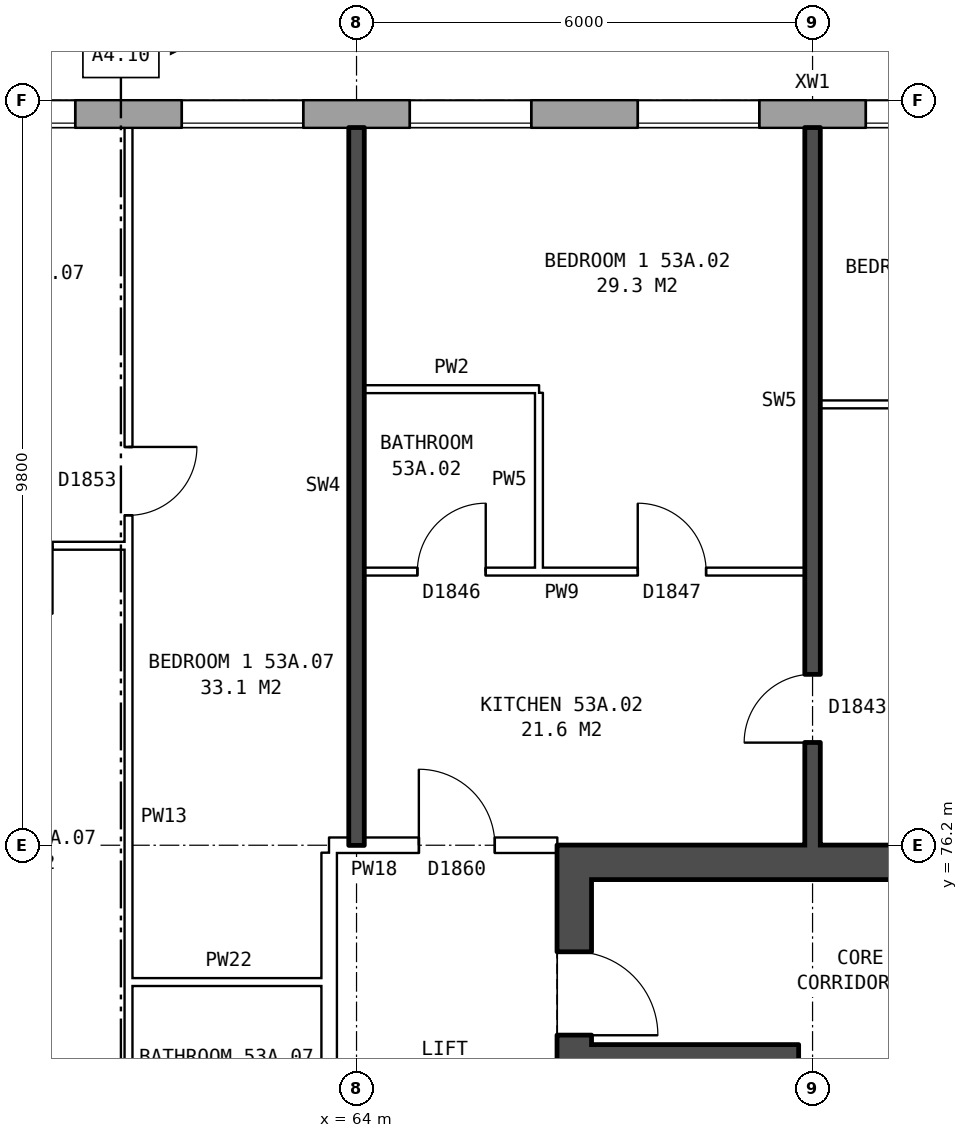
"""IFC4 building model, lengths in metres.
Left out: names, types, materials, properties, quantities, classifications, styles, units other than length and angle.
Written with IfcOpenShell. Run it as: python <this file> out.ifc"""

import sys

from ifc_helpers import new_model, si_unit, direction, frame, frame_2d, origin, place, context, subcontext, project, spatial, rectangle, extrude, element, fill, save


model = new_model("IFC4")
c1 = context("Model", 3, precision=1e-05, world=origin(), true_north=direction((0.0, 1.0)))
c2 = subcontext(c1, "Body", "Model", "MODEL_VIEW")
j1 = project(units=[si_unit("LENGTHUNIT", "METRE"), si_unit("PLANEANGLEUNIT", "RADIAN")], contexts=[c1])
p1 = place(None, origin())
s1 = spatial("IfcSite", under=j1, at=p1, CompositionType="ELEMENT")
p2 = place(p1, origin())
s2 = spatial("IfcBuilding", under=s1, at=p2, CompositionType="ELEMENT")
p3 = place(p2, frame((0.0, 0.0, 188.2)))
s3 = spatial("IfcBuildingStorey", under=s2, at=p3, CompositionType="ELEMENT", Elevation=188.2)
p4 = place(p3, frame((72.925, 85.82, 0.0), z_axis=(0.0, 0.0, 1.0), x_axis=(-1.0, 0.0, 0.0)))
e1 = element("IfcWall", 1, at=p4, inside=s3, PredefinedType="STANDARD", context=c2, shape_type="SweptSolid", body=[
    extrude(rectangle(XDim=39.601, YDim=0.36, at=frame_2d((19.8, 0.0))), origin(), (0.0, 0.0, 1.0), 2.85),
])
p5 = place(p4, frame((0.625, 0.0, 0.8)))
e2 = element("IfcOpeningElement", 2, at=p5, cuts=e1, PredefinedType="OPENING", context=c2, shape_type="SweptSolid", body=[
    extrude(rectangle(XDim=1.6, YDim=1.8, at=frame_2d((0.8, 0.9))), frame((0.0, 0.19, 0.0), z_axis=(0.0, -1.0, 0.0), x_axis=(1.0, 0.0, 0.0)), (0.0, 0.0, 1.0), 0.38),
])
p6 = place(p4, frame((3.625, 0.0, 0.8)))
e3 = element("IfcOpeningElement", 3, at=p6, cuts=e1, PredefinedType="OPENING", context=c2, shape_type="SweptSolid", body=[
    extrude(rectangle(XDim=1.6, YDim=1.8, at=frame_2d((0.8, 0.9))), frame((0.0, 0.19, 0.0), z_axis=(0.0, -1.0, 0.0), x_axis=(1.0, 0.0, 0.0)), (0.0, 0.0, 1.0), 0.38),
])
p7 = place(p4, frame((6.625, 0.0, 0.8)))
e4 = element("IfcOpeningElement", 4, at=p7, cuts=e1, PredefinedType="OPENING", context=c2, shape_type="SweptSolid", body=[
    extrude(rectangle(XDim=1.6, YDim=1.8, at=frame_2d((0.8, 0.9))), frame((0.0, 0.19, 0.0), z_axis=(0.0, -1.0, 0.0), x_axis=(1.0, 0.0, 0.0)), (0.0, 0.0, 1.0), 0.38),
])
p8 = place(p4, frame((9.625, 0.0, 0.8)))
e5 = element("IfcOpeningElement", 5, at=p8, cuts=e1, PredefinedType="OPENING", context=c2, shape_type="SweptSolid", body=[
    extrude(rectangle(XDim=1.6, YDim=1.8, at=frame_2d((0.8, 0.9))), frame((0.0, 0.19, 0.0), z_axis=(0.0, -1.0, 0.0), x_axis=(1.0, 0.0, 0.0)), (0.0, 0.0, 1.0), 0.38),
])
p9 = place(p4, frame((12.625, 0.0, 0.8)))
e6 = element("IfcOpeningElement", 6, at=p9, cuts=e1, PredefinedType="OPENING", context=c2, shape_type="SweptSolid", body=[
    extrude(rectangle(XDim=1.6, YDim=1.8, at=frame_2d((0.8, 0.9))), frame((0.0, 0.19, 0.0), z_axis=(0.0, -1.0, 0.0), x_axis=(1.0, 0.0, 0.0)), (0.0, 0.0, 1.0), 0.38),
])
p10 = place(p4, frame((15.575, 0.0, 0.15)))
e7 = element("IfcOpeningElement", 7, at=p10, cuts=e1, PredefinedType="OPENING", context=c2, shape_type="SweptSolid", body=[
    extrude(rectangle(XDim=0.6, YDim=0.9, at=frame_2d((0.3, 0.45))), frame((0.0, 0.19, 0.0), z_axis=(0.0, -1.0, 0.0), x_axis=(1.0, 0.0, 0.0)), (0.0, 0.0, 1.0), 0.38),
])
p11 = place(p4, frame((18.625, 0.0, 0.8)))
e8 = element("IfcOpeningElement", 8, at=p11, cuts=e1, PredefinedType="OPENING", context=c2, shape_type="SweptSolid", body=[
    extrude(rectangle(XDim=1.6, YDim=1.8, at=frame_2d((0.8, 0.9))), frame((0.0, 0.19, 0.0), z_axis=(0.0, -1.0, 0.0), x_axis=(1.0, 0.0, 0.0)), (0.0, 0.0, 1.0), 0.38),
])
p12 = place(p4, frame((21.125, 0.0, 0.8)))
e9 = element("IfcOpeningElement", 9, at=p12, cuts=e1, PredefinedType="OPENING", context=c2, shape_type="SweptSolid", body=[
    extrude(rectangle(XDim=1.2, YDim=1.8, at=frame_2d((0.6, 0.9))), frame((0.0, 0.19, 0.0), z_axis=(0.0, -1.0, 0.0), x_axis=(1.0, 0.0, 0.0)), (0.0, 0.0, 1.0), 0.38),
])
p13 = place(p4, frame((24.525, 0.0, 1.7)))
e10 = element("IfcOpeningElement", 10, at=p13, cuts=e1, PredefinedType="OPENING", context=c2, shape_type="SweptSolid", body=[
    extrude(rectangle(XDim=0.6, YDim=0.9, at=frame_2d((0.3, 0.45))), frame((0.0, 0.19, 0.0), z_axis=(0.0, -1.0, 0.0), x_axis=(1.0, 0.0, 0.0)), (0.0, 0.0, 1.0), 0.38),
])
p14 = place(p4, frame((27.625, 0.0, 0.8)))
e11 = element("IfcOpeningElement", 11, at=p14, cuts=e1, PredefinedType="OPENING", context=c2, shape_type="SweptSolid", body=[
    extrude(rectangle(XDim=1.6, YDim=1.8, at=frame_2d((0.8, 0.9))), frame((0.0, 0.19, 0.0), z_axis=(0.0, -1.0, 0.0), x_axis=(1.0, 0.0, 0.0)), (0.0, 0.0, 1.0), 0.38),
])
p15 = place(p4, frame((30.625, 0.0, 0.8)))
e12 = element("IfcOpeningElement", 12, at=p15, cuts=e1, PredefinedType="OPENING", context=c2, shape_type="SweptSolid", body=[
    extrude(rectangle(XDim=1.6, YDim=1.8, at=frame_2d((0.8, 0.9))), frame((0.0, 0.19, 0.0), z_axis=(0.0, -1.0, 0.0), x_axis=(1.0, 0.0, 0.0)), (0.0, 0.0, 1.0), 0.38),
])
p16 = place(p4, frame((33.625, 0.0, 0.8)))
e13 = element("IfcOpeningElement", 13, at=p16, cuts=e1, PredefinedType="OPENING", context=c2, shape_type="SweptSolid", body=[
    extrude(rectangle(XDim=1.6, YDim=1.8, at=frame_2d((0.8, 0.9))), frame((0.0, 0.19, 0.0), z_axis=(0.0, -1.0, 0.0), x_axis=(1.0, 0.0, 0.0)), (0.0, 0.0, 1.0), 0.38),
])
p17 = place(p4, frame((36.625, 0.0, 0.8)))
e14 = element("IfcOpeningElement", 14, at=p17, cuts=e1, PredefinedType="OPENING", context=c2, shape_type="SweptSolid", body=[
    extrude(rectangle(XDim=1.6, YDim=1.8, at=frame_2d((0.8, 0.9))), frame((0.0, 0.19, 0.0), z_axis=(0.0, -1.0, 0.0), x_axis=(1.0, 0.0, 0.0)), (0.0, 0.0, 1.0), 0.38),
])
p18 = place(p4, frame((16.475, 0.0, 0.15)))
e15 = element("IfcOpeningElement", 15, at=p18, cuts=e1, PredefinedType="OPENING", context=c2, shape_type="SweptSolid", body=[
    extrude(rectangle(XDim=1.2, YDim=1.8, at=frame_2d((0.6, 0.9))), frame((0.0, 0.19, 0.0), z_axis=(0.0, -1.0, 0.0), x_axis=(1.0, 0.0, 0.0)), (0.0, 0.0, 1.0), 0.38),
])
p19 = place(p4, frame((22.625, 0.0, 0.8)))
e16 = element("IfcOpeningElement", 16, at=p19, cuts=e1, PredefinedType="OPENING", context=c2, shape_type="SweptSolid", body=[
    extrude(rectangle(XDim=0.6, YDim=0.9, at=frame_2d((0.3, 0.45))), frame((0.0, 0.19, 0.0), z_axis=(0.0, -1.0, 0.0), x_axis=(1.0, 0.0, 0.0)), (0.0, 0.0, 1.0), 0.38),
])
p20 = place(p4, frame((25.425, 0.0, 0.8)))
e17 = element("IfcOpeningElement", 17, at=p20, cuts=e1, PredefinedType="OPENING", context=c2, shape_type="SweptSolid", body=[
    extrude(rectangle(XDim=1.2, YDim=1.8, at=frame_2d((0.6, 0.9))), frame((0.0, 0.19, 0.0), z_axis=(0.0, -1.0, 0.0), x_axis=(1.0, 0.0, 0.0)), (0.0, 0.0, 1.0), 0.38),
])
p21 = place(p3, frame((66.865, 63.8, 0.0), z_axis=(0.0, 0.0, 1.0), x_axis=(0.0, 1.0, 0.0)))
e18 = element("IfcWall", 18, at=p21, inside=s3, PredefinedType="SHEAR", context=c2, shape_type="SweptSolid", body=[
    extrude(rectangle(XDim=12.4, YDim=0.45, at=frame_2d((6.2, 0.0))), origin(), (0.0, 0.0, 1.0), 2.85),
])
p22 = place(p21, frame((1.325, 0.0, 0.0)))
e19 = element("IfcOpeningElement", 19, at=p22, cuts=e18, PredefinedType="OPENING", context=c2, shape_type="SweptSolid", body=[
    extrude(rectangle(XDim=1.1, YDim=2.1, at=frame_2d((0.55, 1.05))), frame((0.0, 0.235, 0.0), z_axis=(0.0, -1.0, 0.0), x_axis=(1.0, 0.0, 0.0)), (0.0, 0.0, 1.0), 0.47),
])
p23 = place(p21, frame((3.6, 0.0, 0.0)))
e20 = element("IfcOpeningElement", 20, at=p23, cuts=e18, PredefinedType="OPENING", context=c2, shape_type="SweptSolid", body=[
    extrude(rectangle(XDim=1.1, YDim=2.1, at=frame_2d((0.55, 1.05))), frame((0.0, 0.235, 0.0), z_axis=(0.0, -1.0, 0.0), x_axis=(1.0, 0.0, 0.0)), (0.0, 0.0, 1.0), 0.47),
])
p24 = place(p21, frame((5.8, 0.0, 0.0)))
e21 = element("IfcOpeningElement", 21, at=p24, cuts=e18, PredefinedType="OPENING", context=c2, shape_type="SweptSolid", body=[
    extrude(rectangle(XDim=1.1, YDim=2.1, at=frame_2d((0.55, 1.05))), frame((0.0, 0.235, 0.0), z_axis=(0.0, -1.0, 0.0), x_axis=(1.0, 0.0, 0.0)), (0.0, 0.0, 1.0), 0.47),
])
p25 = place(p21, frame((8.0, 0.0, 0.0)))
e22 = element("IfcOpeningElement", 22, at=p25, cuts=e18, PredefinedType="OPENING", context=c2, shape_type="SweptSolid", body=[
    extrude(rectangle(XDim=1.1, YDim=2.1, at=frame_2d((0.55, 1.05))), frame((0.0, 0.235, 0.0), z_axis=(0.0, -1.0, 0.0), x_axis=(1.0, 0.0, 0.0)), (0.0, 0.0, 1.0), 0.47),
])
p26 = place(p21, frame((9.9, 0.0, 0.0)))
e23 = element("IfcOpeningElement", 23, at=p26, cuts=e18, PredefinedType="OPENING", context=c2, shape_type="SweptSolid", body=[
    extrude(rectangle(XDim=1.1, YDim=2.1, at=frame_2d((0.55, 1.05))), frame((0.0, 0.235, 0.0), z_axis=(0.0, -1.0, 0.0), x_axis=(1.0, 0.0, 0.0)), (0.0, 0.0, 1.0), 0.47),
])
p27 = place(p3, frame((67.09, 75.975, 0.0), z_axis=(0.0, 0.0, 1.0), x_axis=(1.0, 0.0, 0.0)))
e24 = element("IfcWall", 24, at=p27, inside=s3, PredefinedType="SHEAR", context=c2, shape_type="SweptSolid", body=[
    extrude(rectangle(XDim=8.1, YDim=0.45, at=frame_2d((4.05, 0.0))), origin(), (0.0, 0.0, 1.0), 2.85),
])
p28 = place(p3, frame((67.09, 73.45, 0.0), z_axis=(0.0, 0.0, 1.0), x_axis=(1.0, 0.0, 0.0)))
e25 = element("IfcWall", 25, at=p28, inside=s3, PredefinedType="SHEAR", context=c2, shape_type="SweptSolid", body=[
    extrude(rectangle(XDim=2.475, YDim=0.25, at=frame_2d((1.237, 0.0))), origin(), (0.0, 0.0, 1.0), 2.85),
])
p29 = place(p3, frame((69.69, 66.975, 0.0), z_axis=(0.0, 0.0, 1.0), x_axis=(0.0, 1.0, 0.0)))
e26 = element("IfcWall", 26, at=p29, inside=s3, PredefinedType="SHEAR", context=c2, shape_type="SweptSolid", body=[
    extrude(rectangle(XDim=6.6, YDim=0.25, at=frame_2d((3.3, 0.0))), origin(), (0.0, 0.0, 1.0), 2.85),
])
p30 = place(p3, frame((63.64, 63.9, 0.0), z_axis=(0.0, 0.0, 1.0), x_axis=(0.0, 1.0, 0.0)))
e27 = element("IfcWall", 27, at=p30, inside=s3, PredefinedType="PARTITIONING", context=c2, shape_type="SweptSolid", body=[
    extrude(rectangle(XDim=12.2, YDim=0.2, at=frame_2d((6.1, 0.0))), origin(), (0.0, 0.0, 1.0), 2.85),
])
p31 = place(p30, frame((5.1, 0.0, 0.0)))
e28 = element("IfcOpeningElement", 28, at=p31, cuts=e27, PredefinedType="OPENING", context=c2, shape_type="SweptSolid", body=[
    extrude(rectangle(XDim=2.0, YDim=2.1, at=frame_2d((1.0, 1.05))), frame((0.0, 0.11, 0.0), z_axis=(0.0, -1.0, 0.0), x_axis=(1.0, 0.0, 0.0)), (0.0, 0.0, 1.0), 0.22),
])
p32 = place(p3, frame((61.0, 74.4, 0.0), z_axis=(0.0, 0.0, 1.0), x_axis=(1.0, 0.0, 0.0)))
e29 = element("IfcWall", 29, at=p32, inside=s3, PredefinedType="PARTITIONING", context=c2, shape_type="SweptSolid", body=[
    extrude(rectangle(XDim=2.64, YDim=0.1, at=frame_2d((1.32, 0.0))), origin(), (0.0, 0.0, 1.0), 2.85),
])
p33 = place(p3, frame((63.64, 76.2, 0.0), z_axis=(0.0, 0.0, 1.0), x_axis=(1.0, 0.0, 0.0)))
e30 = element("IfcWall", 30, at=p33, inside=s3, PredefinedType="PARTITIONING", context=c2, shape_type="SweptSolid", body=[
    extrude(rectangle(XDim=3.0, YDim=0.2, at=frame_2d((1.5, 0.0))), origin(), (0.0, 0.0, 1.0), 2.85),
])
p34 = place(p33, frame((1.18, 0.0, 0.0)))
e31 = element("IfcOpeningElement", 31, at=p34, cuts=e30, PredefinedType="OPENING", context=c2, shape_type="SweptSolid", body=[
    extrude(rectangle(XDim=1.0, YDim=2.1, at=frame_2d((0.5, 1.05))), frame((0.0, 0.11, 0.0), z_axis=(0.0, -1.0, 0.0), x_axis=(1.0, 0.0, 0.0)), (0.0, 0.0, 1.0), 0.22),
])
p35 = place(p3, frame((64.1, 79.8, 0.0), z_axis=(0.0, 0.0, 1.0), x_axis=(1.0, 0.0, 0.0)))
e32 = element("IfcWall", 32, at=p35, inside=s3, PredefinedType="PARTITIONING", context=c2, shape_type="SweptSolid", body=[
    extrude(rectangle(XDim=5.8, YDim=0.1, at=frame_2d((2.9, 0.0))), origin(), (0.0, 0.0, 1.0), 2.85),
])
p36 = place(p35, frame((3.6, 0.0, 0.0)))
e33 = element("IfcOpeningElement", 33, at=p36, cuts=e32, PredefinedType="OPENING", context=c2, shape_type="SweptSolid", body=[
    extrude(rectangle(XDim=0.9, YDim=2.1, at=frame_2d((0.45, 1.05))), frame((0.0, 0.06, 0.0), z_axis=(0.0, -1.0, 0.0), x_axis=(1.0, 0.0, 0.0)), (0.0, 0.0, 1.0), 0.12),
])
p37 = place(p35, frame((0.7, 0.0, 0.0)))
e34 = element("IfcOpeningElement", 34, at=p37, cuts=e32, PredefinedType="OPENING", context=c2, shape_type="SweptSolid", body=[
    extrude(rectangle(XDim=0.9, YDim=2.1, at=frame_2d((0.45, 1.05))), frame((0.0, 0.06, 0.0), z_axis=(0.0, -1.0, 0.0), x_axis=(1.0, 0.0, 0.0)), (0.0, 0.0, 1.0), 0.12),
])
p38 = place(p3, frame((58.1, 80.14, 0.0), z_axis=(0.0, 0.0, 1.0), x_axis=(1.0, 0.0, 0.0)))
e35 = element("IfcWall", 35, at=p38, inside=s3, PredefinedType="PARTITIONING", context=c2, shape_type="SweptSolid", body=[
    extrude(rectangle(XDim=2.9, YDim=0.1, at=frame_2d((1.45, 0.0))), origin(), (0.0, 0.0, 1.0), 2.85),
])
p39 = place(p38, frame((1.0, 0.0, 0.0)))
e36 = element("IfcOpeningElement", 36, at=p39, cuts=e35, PredefinedType="OPENING", context=c2, shape_type="SweptSolid", body=[
    extrude(rectangle(XDim=0.9, YDim=2.1, at=frame_2d((0.45, 1.05))), frame((0.0, 0.06, 0.0), z_axis=(0.0, -1.0, 0.0), x_axis=(1.0, 0.0, 0.0)), (0.0, 0.0, 1.0), 0.12),
])
p40 = place(p3, frame((70.1, 82.0, 0.0), z_axis=(0.0, 0.0, 1.0), x_axis=(1.0, 0.0, 0.0)))
e37 = element("IfcWall", 37, at=p40, inside=s3, PredefinedType="PARTITIONING", context=c2, shape_type="SweptSolid", body=[
    extrude(rectangle(XDim=5.54, YDim=0.1, at=frame_2d((2.77, 0.0))), origin(), (0.0, 0.0, 1.0), 2.85),
])
p41 = place(p40, frame((2.32, 0.0, 0.0)))
e38 = element("IfcOpeningElement", 38, at=p41, cuts=e37, PredefinedType="OPENING", context=c2, shape_type="SweptSolid", body=[
    extrude(rectangle(XDim=0.9, YDim=2.1, at=frame_2d((0.45, 1.05))), frame((0.0, 0.06, 0.0), z_axis=(0.0, -1.0, 0.0), x_axis=(1.0, 0.0, 0.0)), (0.0, 0.0, 1.0), 0.12),
])
p42 = place(p3, frame((64.1, 82.2, 0.0), z_axis=(0.0, 0.0, 1.0), x_axis=(1.0, 0.0, 0.0)))
e39 = element("IfcWall", 39, at=p42, inside=s3, PredefinedType="PARTITIONING", context=c2, shape_type="SweptSolid", body=[
    extrude(rectangle(XDim=2.3, YDim=0.1, at=frame_2d((1.15, 0.0))), origin(), (0.0, 0.0, 1.0), 2.85),
])
p43 = place(p3, frame((61.0, 71.3, 0.0), z_axis=(0.0, 0.0, 1.0), x_axis=(0.0, 1.0, 0.0)))
e40 = element("IfcWall", 40, at=p43, inside=s3, PredefinedType="PARTITIONING", context=c2, shape_type="SweptSolid", body=[
    extrude(rectangle(XDim=14.34, YDim=0.1, at=frame_2d((7.17, 0.0))), origin(), (0.0, 0.0, 1.0), 2.85),
])
p44 = place(p43, frame((9.24, 0.0, 0.0)))
e41 = element("IfcOpeningElement", 41, at=p44, cuts=e40, PredefinedType="OPENING", context=c2, shape_type="SweptSolid", body=[
    extrude(rectangle(XDim=0.9, YDim=2.1, at=frame_2d((0.45, 1.05))), frame((0.0, 0.06, 0.0), z_axis=(0.0, -1.0, 0.0), x_axis=(1.0, 0.0, 0.0)), (0.0, 0.0, 1.0), 0.12),
])
p45 = place(p43, frame((0.4, 0.0, 0.0)))
e42 = element("IfcOpeningElement", 42, at=p45, cuts=e40, PredefinedType="OPENING", context=c2, shape_type="SweptSolid", body=[
    extrude(rectangle(XDim=0.9, YDim=2.1, at=frame_2d((0.45, 1.05))), frame((0.0, 0.06, 0.0), z_axis=(0.0, -1.0, 0.0), x_axis=(1.0, 0.0, 0.0)), (0.0, 0.0, 1.0), 0.12),
])
p46 = place(p3, frame((64.0, 76.2, 0.0), z_axis=(0.0, 0.0, 1.0), x_axis=(0.0, 1.0, 0.0)))
e43 = element("IfcWall", 43, at=p46, inside=s3, PredefinedType="SOLIDWALL", context=c2, shape_type="SweptSolid", body=[
    extrude(rectangle(XDim=9.44, YDim=0.2, at=frame_2d((4.72, 0.0))), origin(), (0.0, 0.0, 1.0), 2.85),
])
p47 = place(p3, frame((66.4, 79.85, 0.0), z_axis=(0.0, 0.0, 1.0), x_axis=(0.0, 1.0, 0.0)))
e44 = element("IfcWall", 44, at=p47, inside=s3, PredefinedType="PARTITIONING", context=c2, shape_type="SweptSolid", body=[
    extrude(rectangle(XDim=2.3, YDim=0.1, at=frame_2d((1.15, 0.0))), origin(), (0.0, 0.0, 1.0), 2.85),
])
p48 = place(p3, frame((70.0, 76.2, 0.0), z_axis=(0.0, 0.0, 1.0), x_axis=(0.0, 1.0, 0.0)))
e45 = element("IfcWall", 45, at=p48, inside=s3, PredefinedType="SOLIDWALL", context=c2, shape_type="SweptSolid", body=[
    extrude(rectangle(XDim=9.44, YDim=0.2, at=frame_2d((4.72, 0.0))), origin(), (0.0, 0.0, 1.0), 2.85),
])
p49 = place(p48, frame((1.35, 0.0, 0.0)))
e46 = element("IfcOpeningElement", 46, at=p49, cuts=e45, PredefinedType="OPENING", context=c2, shape_type="SweptSolid", body=[
    extrude(rectangle(XDim=0.9, YDim=2.1, at=frame_2d((0.45, 1.05))), frame((0.0, 0.11, 0.0), z_axis=(0.0, -1.0, 0.0), x_axis=(1.0, 0.0, 0.0)), (0.0, 0.0, 1.0), 0.22),
])
p50 = place(p5, origin())
e47 = element("IfcWindow", 47, at=p50, inside=s3, PartitioningType="SINGLE_PANEL", PredefinedType="WINDOW", context=c2, shape_type="SweptSolid", body=[
    extrude(rectangle(XDim=1.6, YDim=1.8, at=frame_2d((0.8, 0.9))), frame((0.0, 0.15, 0.0), z_axis=(0.0, -1.0, 0.0), x_axis=(1.0, 0.0, 0.0)), (0.0, 0.0, 1.0), 0.06),
])
fill(e2, e47)
p51 = place(p6, origin())
e48 = element("IfcWindow", 48, at=p51, inside=s3, PartitioningType="SINGLE_PANEL", PredefinedType="WINDOW", context=c2, shape_type="SweptSolid", body=[
    extrude(rectangle(XDim=1.6, YDim=1.8, at=frame_2d((0.8, 0.9))), frame((0.0, 0.15, 0.0), z_axis=(0.0, -1.0, 0.0), x_axis=(1.0, 0.0, 0.0)), (0.0, 0.0, 1.0), 0.06),
])
fill(e3, e48)
p52 = place(p7, origin())
e49 = element("IfcWindow", 49, at=p52, inside=s3, PartitioningType="SINGLE_PANEL", PredefinedType="WINDOW", context=c2, shape_type="SweptSolid", body=[
    extrude(rectangle(XDim=1.6, YDim=1.8, at=frame_2d((0.8, 0.9))), frame((0.0, 0.15, 0.0), z_axis=(0.0, -1.0, 0.0), x_axis=(1.0, 0.0, 0.0)), (0.0, 0.0, 1.0), 0.06),
])
fill(e4, e49)
p53 = place(p8, origin())
e50 = element("IfcWindow", 50, at=p53, inside=s3, PartitioningType="SINGLE_PANEL", PredefinedType="WINDOW", context=c2, shape_type="SweptSolid", body=[
    extrude(rectangle(XDim=1.6, YDim=1.8, at=frame_2d((0.8, 0.9))), frame((0.0, 0.15, 0.0), z_axis=(0.0, -1.0, 0.0), x_axis=(1.0, 0.0, 0.0)), (0.0, 0.0, 1.0), 0.06),
])
fill(e5, e50)
p54 = place(p9, origin())
e51 = element("IfcWindow", 51, at=p54, inside=s3, PartitioningType="SINGLE_PANEL", PredefinedType="WINDOW", context=c2, shape_type="SweptSolid", body=[
    extrude(rectangle(XDim=1.6, YDim=1.8, at=frame_2d((0.8, 0.9))), frame((0.0, 0.15, 0.0), z_axis=(0.0, -1.0, 0.0), x_axis=(1.0, 0.0, 0.0)), (0.0, 0.0, 1.0), 0.06),
])
fill(e6, e51)
p55 = place(p26, frame((1.1, 0.0, 0.0), z_axis=(0.0, 0.0, 1.0), x_axis=(-1.0, 0.0, 0.0)))
e52 = element("IfcDoor", 52, at=p55, inside=s3, OperationType="SINGLE_SWING_RIGHT", PredefinedType="DOOR", context=c2, shape_type="SweptSolid", body=[
    extrude(rectangle(XDim=1.1, YDim=2.1, at=frame_2d((0.55, 1.05))), frame((0.0, 0.21, 0.0), z_axis=(0.0, -1.0, 0.0), x_axis=(1.0, 0.0, 0.0)), (0.0, 0.0, 1.0), 0.05),
])
fill(e23, e52)
p56 = place(p36, origin())
e53 = element("IfcDoor", 53, at=p56, inside=s3, OperationType="SINGLE_SWING_LEFT", PredefinedType="DOOR", context=c2, shape_type="SweptSolid", body=[
    extrude(rectangle(XDim=0.9, YDim=2.1, at=frame_2d((0.45, 1.05))), frame((0.0, 0.025, 0.0), z_axis=(0.0, -1.0, 0.0), x_axis=(1.0, 0.0, 0.0)), (0.0, 0.0, 1.0), 0.05),
])
fill(e33, e53)
p57 = place(p34, origin())
e54 = element("IfcDoor", 54, at=p57, inside=s3, OperationType="SINGLE_SWING_LEFT", PredefinedType="DOOR", context=c2, shape_type="SweptSolid", body=[
    extrude(rectangle(XDim=1.0, YDim=2.1, at=frame_2d((0.5, 1.05))), frame((0.0, 0.025, 0.0), z_axis=(0.0, -1.0, 0.0), x_axis=(1.0, 0.0, 0.0)), (0.0, 0.0, 1.0), 0.05),
])
fill(e31, e54)
p58 = place(p49, origin())
e55 = element("IfcDoor", 55, at=p58, inside=s3, OperationType="SINGLE_SWING_LEFT", PredefinedType="DOOR", context=c2, shape_type="SweptSolid", body=[
    extrude(rectangle(XDim=0.9, YDim=2.1, at=frame_2d((0.45, 1.05))), frame((0.0, 0.025, 0.0), z_axis=(0.0, -1.0, 0.0), x_axis=(1.0, 0.0, 0.0)), (0.0, 0.0, 1.0), 0.05),
])
fill(e46, e55)
p59 = place(p37, origin())
e56 = element("IfcDoor", 56, at=p59, inside=s3, OperationType="SINGLE_SWING_RIGHT", PredefinedType="DOOR", context=c2, shape_type="SweptSolid", body=[
    extrude(rectangle(XDim=0.9, YDim=2.1, at=frame_2d((0.45, 1.05))), frame((0.0, 0.025, 0.0), z_axis=(0.0, -1.0, 0.0), x_axis=(1.0, 0.0, 0.0)), (0.0, 0.0, 1.0), 0.05),
])
fill(e34, e56)
p60 = place(p44, frame((0.9, 0.0, 0.0), z_axis=(0.0, 0.0, 1.0), x_axis=(-1.0, 0.0, 0.0)))
e57 = element("IfcDoor", 57, at=p60, inside=s3, OperationType="SINGLE_SWING_LEFT", PredefinedType="DOOR", context=c2, shape_type="SweptSolid", body=[
    extrude(rectangle(XDim=0.9, YDim=2.1, at=frame_2d((0.45, 1.05))), frame((0.0, 0.025, 0.0), z_axis=(0.0, -1.0, 0.0), x_axis=(1.0, 0.0, 0.0)), (0.0, 0.0, 1.0), 0.05),
])
fill(e41, e57)
save(model, sys.argv[1])
